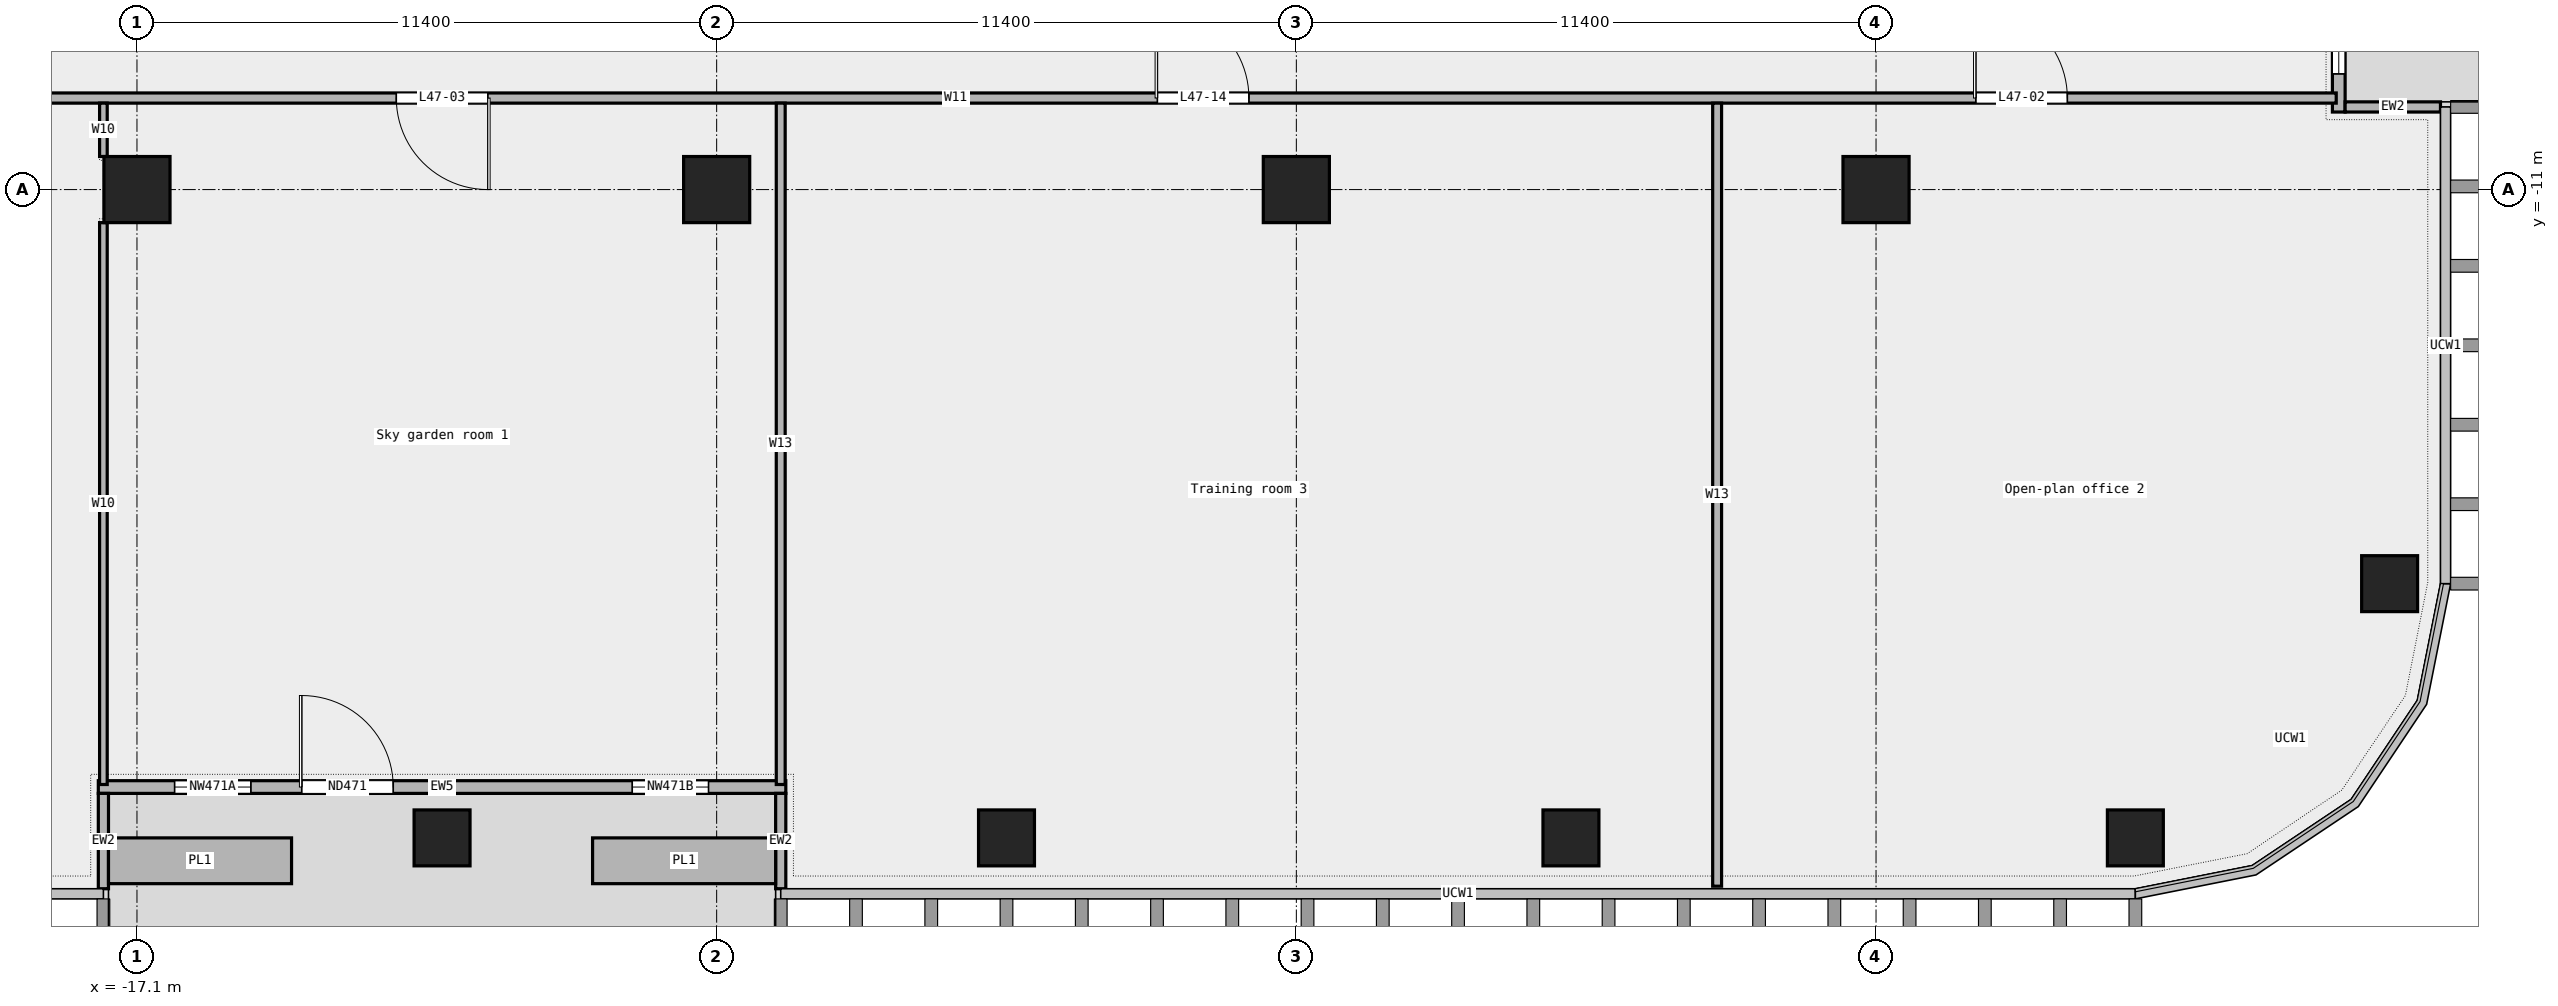
"""IFC4 building model, lengths in metres.
Left out: names, types, materials, properties, quantities, classifications, styles, units other than length and angle.
Written with IfcOpenShell. Run it as: python <this file> out.ifc"""

import sys

from ifc_helpers import new_model, si_unit, direction, frame, frame_2d, origin, origin_2d, place, context, subcontext, project, spatial, rectangle, extrude, element, fill, save


model = new_model("IFC4")
c1 = context("Model", 3, precision=1e-05, world=origin(), true_north=direction((0.0, 1.0)))
c2 = subcontext(c1, "Body", "Model", "MODEL_VIEW")
j1 = project(units=[si_unit("LENGTHUNIT", "METRE"), si_unit("PLANEANGLEUNIT", "RADIAN")], contexts=[c1])
p1 = place(None, origin())
s1 = spatial("IfcSite", under=j1, at=p1, CompositionType="ELEMENT")
p2 = place(p1, origin())
s2 = spatial("IfcBuilding", under=s1, at=p2, CompositionType="ELEMENT")
p3 = place(p2, frame((0.0, 0.0, 223.0)))
s3 = spatial("IfcBuildingStorey", under=s2, at=p3, CompositionType="ELEMENT", Elevation=223.0)
for number, where, z_axis, x_axis in (
    (1, (-11.1, -23.75, 0.0), (0.0, 0.0, 1.0), (1.0, 0.0, 0.0)),
    (2, (0.0, -23.75, 0.0), (0.0, 0.0, 1.0), (1.0, 0.0, 0.0)),
    (3, (11.1, -23.75, 0.0), (0.0, 0.0, 1.0), (1.0, 0.0, 0.0)),
    (4, (22.2, -23.75, 0.0), (0.0, 0.0, 1.0), (1.0, 0.0, 0.0)),
    (5, (27.2, -18.75, 0.0), (0.0, 0.0, 1.0), (1.0, 0.0, 0.0)),
):
    element("IfcColumn", number, at=place(p3, frame(where, z_axis=z_axis, x_axis=x_axis)), inside=s3, PredefinedType="COLUMN", context=c2, shape_type="SweptSolid", body=[
        extrude(rectangle(XDim=1.1, YDim=1.1, at=origin_2d()), origin(), (0.0, 0.0, 1.0), 3.6),
    ])
for number, where, z_axis, x_axis in (
    (6, (-17.1, -11.0, 0.0), (0.0, 0.0, 1.0), (1.0, 0.0, 0.0)),
    (7, (-5.7, -11.0, 0.0), (0.0, 0.0, 1.0), (1.0, 0.0, 0.0)),
    (8, (5.7, -11.0, 0.0), (0.0, 0.0, 1.0), (1.0, 0.0, 0.0)),
    (9, (17.1, -11.0, 0.0), (0.0, 0.0, 1.0), (1.0, 0.0, 0.0)),
):
    element("IfcColumn", number, at=place(p3, frame(where, z_axis=z_axis, x_axis=x_axis)), inside=s3, PredefinedType="COLUMN", context=c2, shape_type="SweptSolid", body=[
        extrude(rectangle(XDim=1.3, YDim=1.3, at=origin_2d()), origin(), (0.0, 0.0, 1.0), 3.6),
    ])
p4 = place(p3, frame((-17.86, -22.75, 0.0), z_axis=(0.0, 0.0, 1.0), x_axis=(1.0, 0.0, 0.0)))
e10 = element("IfcWall", 10, at=p4, inside=s3, PredefinedType="STANDARD", context=c2, shape_type="SweptSolid", body=[
    extrude(rectangle(XDim=13.52, YDim=0.25, at=frame_2d((6.76, 0.0))), origin(), (0.0, 0.0, 1.0), 3.6),
])
p5 = place(p4, frame((1.5, 0.0, 0.45)))
e11 = element("IfcOpeningElement", 11, at=p5, cuts=e10, PredefinedType="OPENING", context=c2, shape_type="SweptSolid", body=[
    extrude(rectangle(XDim=1.5, YDim=2.4, at=frame_2d((0.75, 1.2))), frame((0.0, 0.137, 0.0), z_axis=(0.0, -1.0, 0.0), x_axis=(1.0, 0.0, 0.0)), (0.0, 0.0, 1.0), 0.274),
])
p6 = place(p4, frame((4.0, 0.0, 0.0)))
e12 = element("IfcOpeningElement", 12, at=p6, cuts=e10, PredefinedType="OPENING", context=c2, shape_type="SweptSolid", body=[
    extrude(rectangle(XDim=1.8, YDim=2.4, at=frame_2d((0.9, 1.2))), frame((0.0, 0.137, 0.0), z_axis=(0.0, -1.0, 0.0), x_axis=(1.0, 0.0, 0.0)), (0.0, 0.0, 1.0), 0.274),
])
p7 = place(p4, frame((10.5, 0.0, 0.45)))
e13 = element("IfcOpeningElement", 13, at=p7, cuts=e10, PredefinedType="OPENING", context=c2, shape_type="SweptSolid", body=[
    extrude(rectangle(XDim=1.5, YDim=2.4, at=frame_2d((0.75, 1.2))), frame((0.0, 0.137, 0.0), z_axis=(0.0, -1.0, 0.0), x_axis=(1.0, 0.0, 0.0)), (0.0, 0.0, 1.0), 0.274),
])
for number, where, z_axis, x_axis in (
    (14, (-17.76, -24.75, 0.0), (0.0, 0.0, 1.0), (0.0, 1.0, 0.0)),
    (15, (-4.44, -24.75, 0.0), (0.0, 0.0, 1.0), (0.0, 1.0, 0.0)),
):
    element("IfcWall", number, at=place(p3, frame(where, z_axis=z_axis, x_axis=x_axis)), inside=s3, PredefinedType="STANDARD", context=c2, shape_type="SweptSolid", body=[
        extrude(rectangle(XDim=1.875, YDim=0.2, at=frame_2d((0.938, 0.0))), origin(), (0.0, 0.0, 1.0), 3.6),
    ])
for number, where, z_axis, x_axis in (
    (16, (-17.66, -24.2, 0.0), (0.0, 0.0, 1.0), (1.0, 0.0, 0.0)),
    (17, (-8.14, -24.2, 0.0), (0.0, 0.0, 1.0), (1.0, 0.0, 0.0)),
):
    element("IfcWall", number, at=place(p3, frame(where, z_axis=z_axis, x_axis=x_axis)), inside=s3, PredefinedType="STANDARD", context=c2, shape_type="SweptSolid", body=[
        extrude(rectangle(XDim=3.6, YDim=0.9, at=frame_2d((1.8, 0.0))), origin(), (0.0, 0.0, 1.0), 0.7),
    ])
p8 = place(p3, frame((26.2, -9.475, 0.0), z_axis=(0.0, 0.0, 1.0), x_axis=(0.0, 1.0, 0.0)))
e18 = element("IfcWall", 18, at=p8, inside=s3, PredefinedType="STANDARD", context=c2, shape_type="SweptSolid", body=[
    extrude(rectangle(XDim=14.263, YDim=0.25, at=frame_2d((7.131, 0.0))), origin(), (0.0, 0.0, 1.0), 3.6),
])
p9 = place(p8, frame((0.75, 0.0, 0.45)))
e19 = element("IfcOpeningElement", 19, at=p9, cuts=e18, PredefinedType="OPENING", context=c2, shape_type="SweptSolid", body=[
    extrude(rectangle(XDim=1.5, YDim=2.4, at=frame_2d((0.75, 1.2))), frame((0.0, 0.137, 0.0), z_axis=(0.0, -1.0, 0.0), x_axis=(1.0, 0.0, 0.0)), (0.0, 0.0, 1.0), 0.274),
])
p10 = place(p8, frame((6.25, 0.0, 0.0)))
e20 = element("IfcOpeningElement", 20, at=p10, cuts=e18, PredefinedType="OPENING", context=c2, shape_type="SweptSolid", body=[
    extrude(rectangle(XDim=1.8, YDim=2.4, at=frame_2d((0.9, 1.2))), frame((0.0, 0.137, 0.0), z_axis=(0.0, -1.0, 0.0), x_axis=(1.0, 0.0, 0.0)), (0.0, 0.0, 1.0), 0.274),
])
p11 = place(p8, frame((11.0, 0.0, 0.45)))
e21 = element("IfcOpeningElement", 21, at=p11, cuts=e18, PredefinedType="OPENING", context=c2, shape_type="SweptSolid", body=[
    extrude(rectangle(XDim=1.5, YDim=2.4, at=frame_2d((0.75, 1.2))), frame((0.0, 0.137, 0.0), z_axis=(0.0, -1.0, 0.0), x_axis=(1.0, 0.0, 0.0)), (0.0, 0.0, 1.0), 0.274),
])
p12 = place(p3, frame((28.2, -9.375, 0.0), z_axis=(0.0, 0.0, 1.0), x_axis=(-1.0, 0.0, 0.0)))
e22 = element("IfcWall", 22, at=p12, inside=s3, PredefinedType="STANDARD", context=c2, shape_type="SweptSolid", body=[
    extrude(rectangle(XDim=1.875, YDim=0.2, at=frame_2d((0.938, 0.0))), origin(), (0.0, 0.0, 1.0), 3.6),
])
p13 = place(p3, frame((-28.15, -9.2, 0.0), z_axis=(0.0, 0.0, 1.0), x_axis=(1.0, 0.0, 0.0)))
e23 = element("IfcWall", 23, at=p13, inside=s3, PredefinedType="PARTITIONING", context=c2, shape_type="SweptSolid", body=[
    extrude(rectangle(XDim=54.3, YDim=0.2, at=frame_2d((27.15, 0.0))), origin(), (0.0, 0.0, 1.0), 3.6),
])
p14 = place(p13, frame((47.212, 0.0, 0.0)))
e24 = element("IfcOpeningElement", 24, at=p14, cuts=e23, PredefinedType="OPENING", context=c2, shape_type="SweptSolid", body=[
    extrude(rectangle(XDim=1.8, YDim=2.1, at=frame_2d((0.9, 1.05))), frame((0.0, 0.112, 0.0), z_axis=(0.0, -1.0, 0.0), x_axis=(1.0, 0.0, 0.0)), (0.0, 0.0, 1.0), 0.224),
])
p15 = place(p13, frame((16.15, 0.0, 0.0)))
e25 = element("IfcOpeningElement", 25, at=p15, cuts=e23, PredefinedType="OPENING", context=c2, shape_type="SweptSolid", body=[
    extrude(rectangle(XDim=1.8, YDim=2.1, at=frame_2d((0.9, 1.05))), frame((0.0, 0.112, 0.0), z_axis=(0.0, -1.0, 0.0), x_axis=(1.0, 0.0, 0.0)), (0.0, 0.0, 1.0), 0.224),
])
p16 = place(p13, frame((4.545, 0.0, 0.0)))
e26 = element("IfcOpeningElement", 26, at=p16, cuts=e23, PredefinedType="OPENING", context=c2, shape_type="SweptSolid", body=[
    extrude(rectangle(XDim=1.5, YDim=2.1, at=frame_2d((0.75, 1.05))), frame((0.0, 0.112, 0.0), z_axis=(0.0, -1.0, 0.0), x_axis=(1.0, 0.0, 0.0)), (0.0, 0.0, 1.0), 0.224),
])
p17 = place(p13, frame((31.117, 0.0, 0.0)))
e27 = element("IfcOpeningElement", 27, at=p17, cuts=e23, PredefinedType="OPENING", context=c2, shape_type="SweptSolid", body=[
    extrude(rectangle(XDim=1.8, YDim=2.1, at=frame_2d((0.9, 1.05))), frame((0.0, 0.112, 0.0), z_axis=(0.0, -1.0, 0.0), x_axis=(1.0, 0.0, 0.0)), (0.0, 0.0, 1.0), 0.224),
])
p18 = place(p3, frame((-17.76, -22.7, 0.0), z_axis=(0.0, 0.0, 1.0), x_axis=(0.0, 1.0, 0.0)))
e28 = element("IfcWall", 28, at=p18, inside=s3, PredefinedType="PARTITIONING", context=c2, shape_type="SweptSolid", body=[
    extrude(rectangle(XDim=11.05, YDim=0.15, at=frame_2d((5.525, 0.0))), origin(), (0.0, 0.0, 1.0), 3.6),
])
p19 = place(p3, frame((-17.76, -10.35, 0.0), z_axis=(0.0, 0.0, 1.0), x_axis=(0.0, 1.0, 0.0)))
e29 = element("IfcWall", 29, at=p19, inside=s3, PredefinedType="PARTITIONING", context=c2, shape_type="SweptSolid", body=[
    extrude(rectangle(XDim=1.05, YDim=0.15, at=frame_2d((0.525, 0.0))), origin(), (0.0, 0.0, 1.0), 3.6),
])
p20 = place(p3, frame((-4.44, -22.7, 0.0), z_axis=(0.0, 0.0, 1.0), x_axis=(0.0, 1.0, 0.0)))
e30 = element("IfcWall", 30, at=p20, inside=s3, PredefinedType="PARTITIONING", context=c2, shape_type="SweptSolid", body=[
    extrude(rectangle(XDim=13.4, YDim=0.175, at=frame_2d((6.7, 0.0))), origin(), (0.0, 0.0, 1.0), 3.6),
])
p21 = place(p3, frame((13.975, -24.7, 0.0), z_axis=(0.0, 0.0, 1.0), x_axis=(0.0, 1.0, 0.0)))
e31 = element("IfcWall", 31, at=p21, inside=s3, PredefinedType="PARTITIONING", context=c2, shape_type="SweptSolid", body=[
    extrude(rectangle(XDim=15.4, YDim=0.175, at=frame_2d((7.7, 0.0))), origin(), (0.0, 0.0, 1.0), 3.6),
])
p22 = place(p5, origin())
e32 = element("IfcWindow", 32, at=p22, inside=s3, PartitioningType="SINGLE_PANEL", PredefinedType="WINDOW", context=c2, shape_type="SweptSolid", body=[
    extrude(rectangle(XDim=1.5, YDim=2.4, at=frame_2d((0.75, 1.2))), frame((0.0, 0.03, 0.0), z_axis=(0.0, -1.0, 0.0), x_axis=(1.0, 0.0, 0.0)), (0.0, 0.0, 1.0), 0.06),
])
fill(e11, e32)
p23 = place(p6, origin())
e33 = element("IfcDoor", 33, at=p23, inside=s3, OperationType="DOUBLE_DOOR_SINGLE_SWING", PredefinedType="DOOR", context=c2, shape_type="SweptSolid", body=[
    extrude(rectangle(XDim=1.8, YDim=2.4, at=frame_2d((0.9, 1.2))), frame((0.0, 0.025, 0.0), z_axis=(0.0, -1.0, 0.0), x_axis=(1.0, 0.0, 0.0)), (0.0, 0.0, 1.0), 0.05),
])
fill(e12, e33)
p24 = place(p7, origin())
e34 = element("IfcWindow", 34, at=p24, inside=s3, PartitioningType="SINGLE_PANEL", PredefinedType="WINDOW", context=c2, shape_type="SweptSolid", body=[
    extrude(rectangle(XDim=1.5, YDim=2.4, at=frame_2d((0.75, 1.2))), frame((0.0, 0.03, 0.0), z_axis=(0.0, -1.0, 0.0), x_axis=(1.0, 0.0, 0.0)), (0.0, 0.0, 1.0), 0.06),
])
fill(e13, e34)
p25 = place(p9, origin())
e35 = element("IfcWindow", 35, at=p25, inside=s3, PartitioningType="SINGLE_PANEL", PredefinedType="WINDOW", context=c2, shape_type="SweptSolid", body=[
    extrude(rectangle(XDim=1.5, YDim=2.4, at=frame_2d((0.75, 1.2))), frame((0.0, 0.03, 0.0), z_axis=(0.0, -1.0, 0.0), x_axis=(1.0, 0.0, 0.0)), (0.0, 0.0, 1.0), 0.06),
])
fill(e19, e35)
p26 = place(p14, origin())
e36 = element("IfcDoor", 36, at=p26, inside=s3, OperationType="DOUBLE_DOOR_SINGLE_SWING", PredefinedType="DOOR", context=c2, shape_type="SweptSolid", body=[
    extrude(rectangle(XDim=1.8, YDim=2.1, at=frame_2d((0.9, 1.05))), frame((0.0, 0.025, 0.0), z_axis=(0.0, -1.0, 0.0), x_axis=(1.0, 0.0, 0.0)), (0.0, 0.0, 1.0), 0.05),
])
fill(e24, e36)
p27 = place(p15, origin())
e37 = element("IfcDoor", 37, at=p27, inside=s3, OperationType="DOUBLE_DOOR_SINGLE_SWING", PredefinedType="DOOR", context=c2, shape_type="SweptSolid", body=[
    extrude(rectangle(XDim=1.8, YDim=2.1, at=frame_2d((0.9, 1.05))), frame((0.0, 0.025, 0.0), z_axis=(0.0, -1.0, 0.0), x_axis=(1.0, 0.0, 0.0)), (0.0, 0.0, 1.0), 0.05),
])
fill(e25, e37)
p28 = place(p17, origin())
e38 = element("IfcDoor", 38, at=p28, inside=s3, OperationType="DOUBLE_DOOR_SINGLE_SWING", PredefinedType="DOOR", context=c2, shape_type="SweptSolid", body=[
    extrude(rectangle(XDim=1.8, YDim=2.1, at=frame_2d((0.9, 1.05))), frame((0.0, 0.025, 0.0), z_axis=(0.0, -1.0, 0.0), x_axis=(1.0, 0.0, 0.0)), (0.0, 0.0, 1.0), 0.05),
])
fill(e27, e38)
save(model, sys.argv[1])
